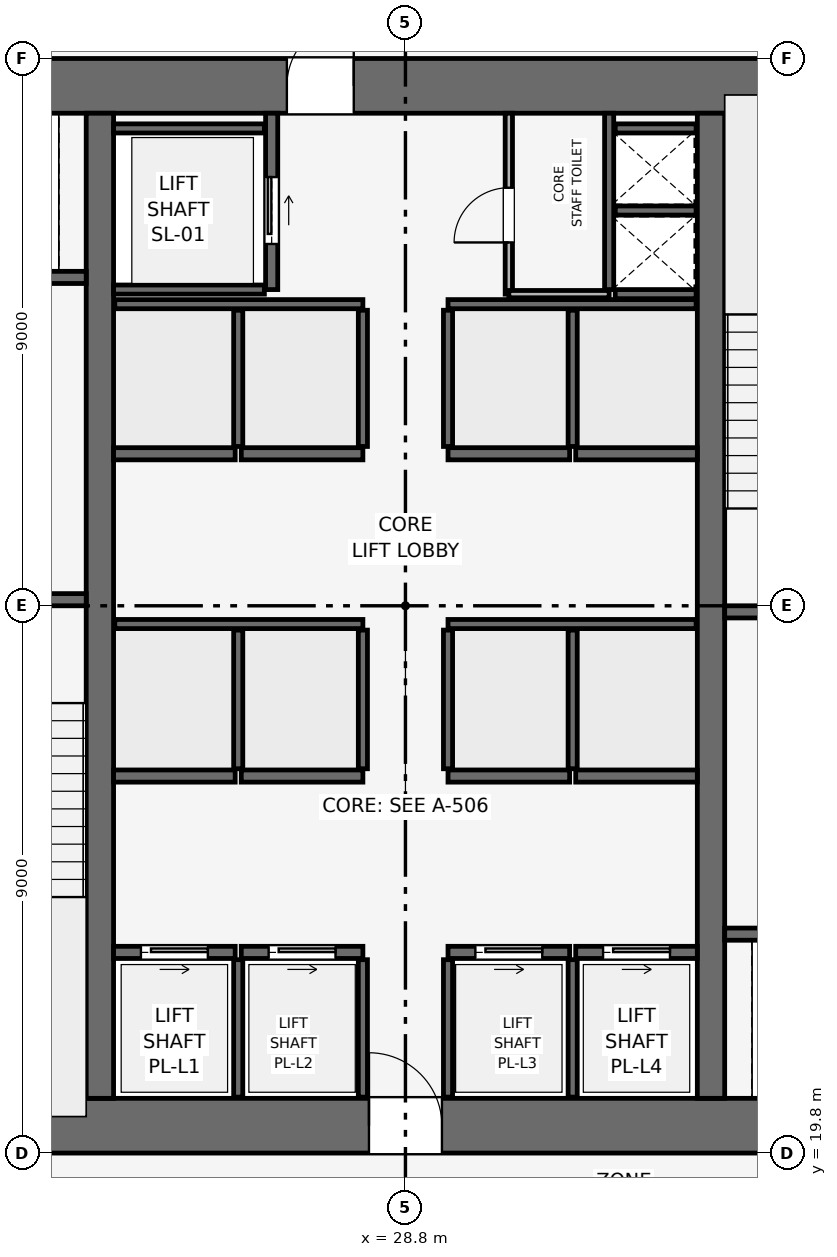
"""IFC4 building model, lengths in metres.
Left out: names, types, materials, properties, quantities, classifications, styles, units other than length and angle.
Written with IfcOpenShell. Run it as: python <this file> out.ifc"""

import sys

from ifc_helpers import new_model, si_unit, direction, frame, frame_2d, origin, place, context, subcontext, project, spatial, rectangle, extrude, element, fill, save


model = new_model("IFC4")
c1 = context("Model", 3, precision=1e-05, world=origin(), true_north=direction((0.0, 1.0)))
c2 = subcontext(c1, "Body", "Model", "MODEL_VIEW")
j1 = project(units=[si_unit("LENGTHUNIT", "METRE"), si_unit("PLANEANGLEUNIT", "RADIAN")], contexts=[c1])
p1 = place(None, origin())
s1 = spatial("IfcSite", under=j1, at=p1, CompositionType="ELEMENT")
p2 = place(p1, origin())
s2 = spatial("IfcBuilding", under=s1, at=p2, CompositionType="ELEMENT")
p3 = place(p2, frame((0.0, 0.0, 125.1)))
s3 = spatial("IfcBuildingStorey", under=s2, at=p3, CompositionType="ELEMENT", Elevation=125.1)
p4 = place(p3, frame((19.8, 20.25, 0.0), z_axis=(0.0, 0.0, 1.0), x_axis=(1.0, 0.0, 0.0)))
e1 = element("IfcWall", 1, at=p4, inside=s3, PredefinedType="SHEAR", context=c2, shape_type="SweptSolid", body=[
    extrude(rectangle(XDim=18.0, YDim=0.9, at=frame_2d((9.0, 0.0))), origin(), (0.0, 0.0, 1.0), 3.9),
])
p5 = place(p4, frame((8.4, 0.0, 0.0)))
e2 = element("IfcOpeningElement", 2, at=p5, cuts=e1, PredefinedType="OPENING", context=c2, shape_type="SweptSolid", body=[
    extrude(rectangle(XDim=1.2, YDim=2.2, at=frame_2d((0.6, 1.1))), frame((0.0, 0.46, 0.0), z_axis=(0.0, -1.0, 0.0), x_axis=(1.0, 0.0, 0.0)), (0.0, 0.0, 1.0), 0.92),
])
p6 = place(p3, frame((19.8, 37.35, 0.0), z_axis=(0.0, 0.0, 1.0), x_axis=(1.0, 0.0, 0.0)))
e3 = element("IfcWall", 3, at=p6, inside=s3, PredefinedType="SHEAR", context=c2, shape_type="SweptSolid", body=[
    extrude(rectangle(XDim=18.0, YDim=0.9, at=frame_2d((9.0, 0.0))), origin(), (0.0, 0.0, 1.0), 3.9),
])
p7 = place(p6, frame((7.05, 0.0, 0.0)))
e4 = element("IfcOpeningElement", 4, at=p7, cuts=e3, PredefinedType="OPENING", context=c2, shape_type="SweptSolid", body=[
    extrude(rectangle(XDim=1.1, YDim=2.15, at=frame_2d((0.55, 1.075))), frame((0.0, 0.46, 0.0), z_axis=(0.0, -1.0, 0.0), x_axis=(1.0, 0.0, 0.0)), (0.0, 0.0, 1.0), 0.92),
])
for number, where, z_axis, x_axis in (
    (5, (23.775, 20.7, 0.0), (0.0, 0.0, 1.0), (0.0, 1.0, 0.0)),
    (6, (33.825, 20.7, 0.0), (0.0, 0.0, 1.0), (0.0, 1.0, 0.0)),
):
    element("IfcWall", number, at=place(p3, frame(where, z_axis=z_axis, x_axis=x_axis)), inside=s3, PredefinedType="SHEAR", context=c2, shape_type="SweptSolid", body=[
        extrude(rectangle(XDim=16.2, YDim=0.45, at=frame_2d((8.1, 0.0))), origin(), (0.0, 0.0, 1.0), 3.9),
    ])
p8 = place(p3, frame((20.4, 28.9, 0.0), z_axis=(0.0, 0.0, 1.0), x_axis=(1.0, 0.0, 0.0)))
e7 = element("IfcWall", 7, at=p8, inside=s3, PredefinedType="SHEAR", context=c2, shape_type="SweptSolid", body=[
    extrude(rectangle(XDim=3.15, YDim=0.2, at=frame_2d((1.575, 0.0))), origin(), (0.0, 0.0, 1.0), 3.65),
])
p9 = place(p8, frame((0.8, 0.0, 0.0)))
e8 = element("IfcOpeningElement", 8, at=p9, cuts=e7, PredefinedType="OPENING", context=c2, shape_type="SweptSolid", body=[
    extrude(rectangle(XDim=1.0, YDim=2.1, at=frame_2d((0.5, 1.05))), frame((0.0, 0.11, 0.0), z_axis=(0.0, -1.0, 0.0), x_axis=(1.0, 0.0, 0.0)), (0.0, 0.0, 1.0), 0.22),
])
p10 = place(p3, frame((34.05, 28.7, 0.0), z_axis=(0.0, 0.0, 1.0), x_axis=(1.0, 0.0, 0.0)))
e9 = element("IfcWall", 9, at=p10, inside=s3, PredefinedType="SHEAR", context=c2, shape_type="SweptSolid", body=[
    extrude(rectangle(XDim=3.15, YDim=0.2, at=frame_2d((1.575, 0.0))), origin(), (0.0, 0.0, 1.0), 3.65),
])
p11 = place(p10, frame((0.8, 0.0, 0.0)))
e10 = element("IfcOpeningElement", 10, at=p11, cuts=e9, PredefinedType="OPENING", context=c2, shape_type="SweptSolid", body=[
    extrude(rectangle(XDim=1.0, YDim=2.1, at=frame_2d((0.5, 1.05))), frame((0.0, 0.11, 0.0), z_axis=(0.0, -1.0, 0.0), x_axis=(1.0, 0.0, 0.0)), (0.0, 0.0, 1.0), 0.22),
])
p12 = place(p3, frame((32.15, 34.0, 0.0), z_axis=(0.0, 0.0, 1.0), x_axis=(0.0, 1.0, 0.0)))
e11 = element("IfcWall", 11, at=p12, inside=s3, PredefinedType="SHEAR", context=c2, shape_type="SweptSolid", body=[
    extrude(rectangle(XDim=2.9, YDim=0.15, at=frame_2d((1.45, 0.0))), origin(), (0.0, 0.0, 1.0), 3.65),
])
for number, where, z_axis, x_axis in (
    (12, (32.25, 33.925, 0.0), (0.0, 0.0, 1.0), (1.0, 0.0, 0.0)),
    (13, (32.25, 35.3, 0.0), (0.0, 0.0, 1.0), (1.0, 0.0, 0.0)),
):
    element("IfcWall", number, at=place(p3, frame(where, z_axis=z_axis, x_axis=x_axis)), inside=s3, PredefinedType="SHEAR", context=c2, shape_type="SweptSolid", body=[
        extrude(rectangle(XDim=1.33, YDim=0.15, at=frame_2d((0.665, 0.0))), origin(), (0.0, 0.0, 1.0), 3.65),
    ])
p13 = place(p3, frame((20.5, 34.2, 0.0), z_axis=(0.0, 0.0, 1.0), x_axis=(1.0, 0.0, 0.0)))
e14 = element("IfcWall", 14, at=p13, inside=s3, PredefinedType="SHEAR", context=c2, shape_type="SweptSolid", body=[
    extrude(rectangle(XDim=3.05, YDim=0.2, at=frame_2d((1.525, 0.0))), origin(), (0.0, 0.0, 1.0), 3.65),
])
p14 = place(p13, frame((0.75, 0.0, 0.0)))
e15 = element("IfcOpeningElement", 15, at=p14, cuts=e14, PredefinedType="OPENING", context=c2, shape_type="SweptSolid", body=[
    extrude(rectangle(XDim=1.1, YDim=2.15, at=frame_2d((0.55, 1.075))), frame((0.0, 0.11, 0.0), z_axis=(0.0, -1.0, 0.0), x_axis=(1.0, 0.0, 0.0)), (0.0, 0.0, 1.0), 0.22),
])
p15 = place(p3, frame((34.05, 23.4, 0.0), z_axis=(0.0, 0.0, 1.0), x_axis=(1.0, 0.0, 0.0)))
e16 = element("IfcWall", 16, at=p15, inside=s3, PredefinedType="SHEAR", context=c2, shape_type="SweptSolid", body=[
    extrude(rectangle(XDim=3.05, YDim=0.2, at=frame_2d((1.525, 0.0))), origin(), (0.0, 0.0, 1.0), 3.65),
])
p16 = place(p15, frame((1.2, 0.0, 0.0)))
e17 = element("IfcOpeningElement", 17, at=p16, cuts=e16, PredefinedType="OPENING", context=c2, shape_type="SweptSolid", body=[
    extrude(rectangle(XDim=1.1, YDim=2.15, at=frame_2d((0.55, 1.075))), frame((0.0, 0.11, 0.0), z_axis=(0.0, -1.0, 0.0), x_axis=(1.0, 0.0, 0.0)), (0.0, 0.0, 1.0), 0.22),
])
p17 = place(p3, frame((26.6, 34.0, 0.0), z_axis=(0.0, 0.0, 1.0), x_axis=(0.0, 1.0, 0.0)))
e18 = element("IfcWall", 18, at=p17, inside=s3, PredefinedType="SHEAR", context=c2, shape_type="SweptSolid", body=[
    extrude(rectangle(XDim=2.9, YDim=0.2, at=frame_2d((1.45, 0.0))), origin(), (0.0, 0.0, 1.0), 3.65),
])
p18 = place(p17, frame((0.75, 0.0, 0.0)))
e19 = element("IfcOpeningElement", 19, at=p18, cuts=e18, PredefinedType="OPENING", context=c2, shape_type="SweptSolid", body=[
    extrude(rectangle(XDim=1.1, YDim=2.15, at=frame_2d((0.55, 1.075))), frame((0.0, 0.11, 0.0), z_axis=(0.0, -1.0, 0.0), x_axis=(1.0, 0.0, 0.0)), (0.0, 0.0, 1.0), 0.22),
])
for number, where, z_axis, x_axis in (
    (20, (24.0, 34.0, 0.0), (0.0, 0.0, 1.0), (1.0, 0.0, 0.0)),
    (21, (24.0, 36.65, 0.0), (0.0, 0.0, 1.0), (1.0, 0.0, 0.0)),
):
    element("IfcWall", number, at=place(p3, frame(where, z_axis=z_axis, x_axis=x_axis)), inside=s3, PredefinedType="SHEAR", context=c2, shape_type="SweptSolid", body=[
        extrude(rectangle(XDim=2.48, YDim=0.15, at=frame_2d((1.24, 0.0))), origin(), (0.0, 0.0, 1.0), 3.65),
    ])
p19 = place(p3, frame((24.0, 23.1, 0.0), z_axis=(0.0, 0.0, 1.0), x_axis=(1.0, 0.0, 0.0)))
e22 = element("IfcWall", 22, at=p19, inside=s3, PredefinedType="SHEAR", context=c2, shape_type="SweptSolid", body=[
    extrude(rectangle(XDim=2.0, YDim=0.2, at=frame_2d((1.0, 0.0))), origin(), (0.0, 0.0, 1.0), 3.65),
])
p20 = place(p19, frame((0.45, 0.0, 0.0)))
e23 = element("IfcOpeningElement", 23, at=p20, cuts=e22, PredefinedType="OPENING", context=c2, shape_type="SweptSolid", body=[
    extrude(rectangle(XDim=1.1, YDim=2.15, at=frame_2d((0.55, 1.075))), frame((0.0, 0.11, 0.0), z_axis=(0.0, -1.0, 0.0), x_axis=(1.0, 0.0, 0.0)), (0.0, 0.0, 1.0), 0.22),
])
p21 = place(p3, frame((26.1, 23.1, 0.0), z_axis=(0.0, 0.0, 1.0), x_axis=(1.0, 0.0, 0.0)))
e24 = element("IfcWall", 24, at=p21, inside=s3, PredefinedType="SHEAR", context=c2, shape_type="SweptSolid", body=[
    extrude(rectangle(XDim=2.0, YDim=0.2, at=frame_2d((1.0, 0.0))), origin(), (0.0, 0.0, 1.0), 3.65),
])
p22 = place(p21, frame((0.45, 0.0, 0.0)))
e25 = element("IfcOpeningElement", 25, at=p22, cuts=e24, PredefinedType="OPENING", context=c2, shape_type="SweptSolid", body=[
    extrude(rectangle(XDim=1.1, YDim=2.15, at=frame_2d((0.55, 1.075))), frame((0.0, 0.11, 0.0), z_axis=(0.0, -1.0, 0.0), x_axis=(1.0, 0.0, 0.0)), (0.0, 0.0, 1.0), 0.22),
])
p23 = place(p3, frame((29.5, 23.1, 0.0), z_axis=(0.0, 0.0, 1.0), x_axis=(1.0, 0.0, 0.0)))
e26 = element("IfcWall", 26, at=p23, inside=s3, PredefinedType="SHEAR", context=c2, shape_type="SweptSolid", body=[
    extrude(rectangle(XDim=2.0, YDim=0.2, at=frame_2d((1.0, 0.0))), origin(), (0.0, 0.0, 1.0), 3.65),
])
p24 = place(p23, frame((0.45, 0.0, 0.0)))
e27 = element("IfcOpeningElement", 27, at=p24, cuts=e26, PredefinedType="OPENING", context=c2, shape_type="SweptSolid", body=[
    extrude(rectangle(XDim=1.1, YDim=2.15, at=frame_2d((0.55, 1.075))), frame((0.0, 0.11, 0.0), z_axis=(0.0, -1.0, 0.0), x_axis=(1.0, 0.0, 0.0)), (0.0, 0.0, 1.0), 0.22),
])
p25 = place(p3, frame((31.6, 23.1, 0.0), z_axis=(0.0, 0.0, 1.0), x_axis=(1.0, 0.0, 0.0)))
e28 = element("IfcWall", 28, at=p25, inside=s3, PredefinedType="SHEAR", context=c2, shape_type="SweptSolid", body=[
    extrude(rectangle(XDim=2.0, YDim=0.2, at=frame_2d((1.0, 0.0))), origin(), (0.0, 0.0, 1.0), 3.65),
])
p26 = place(p25, frame((0.45, 0.0, 0.0)))
e29 = element("IfcOpeningElement", 29, at=p26, cuts=e28, PredefinedType="OPENING", context=c2, shape_type="SweptSolid", body=[
    extrude(rectangle(XDim=1.1, YDim=2.15, at=frame_2d((0.55, 1.075))), frame((0.0, 0.11, 0.0), z_axis=(0.0, -1.0, 0.0), x_axis=(1.0, 0.0, 0.0)), (0.0, 0.0, 1.0), 0.22),
])
for number, where, z_axis, x_axis in (
    (30, (24.0, 26.0, 0.0), (0.0, 0.0, 1.0), (1.0, 0.0, 0.0)),
    (31, (26.1, 26.0, 0.0), (0.0, 0.0, 1.0), (1.0, 0.0, 0.0)),
    (32, (29.5, 26.0, 0.0), (0.0, 0.0, 1.0), (1.0, 0.0, 0.0)),
    (33, (31.6, 26.0, 0.0), (0.0, 0.0, 1.0), (1.0, 0.0, 0.0)),
    (34, (24.0, 31.3, 0.0), (0.0, 0.0, 1.0), (1.0, 0.0, 0.0)),
    (35, (26.1, 31.3, 0.0), (0.0, 0.0, 1.0), (1.0, 0.0, 0.0)),
    (36, (29.5, 31.3, 0.0), (0.0, 0.0, 1.0), (1.0, 0.0, 0.0)),
    (37, (31.6, 31.3, 0.0), (0.0, 0.0, 1.0), (1.0, 0.0, 0.0)),
):
    element("IfcWall", number, at=place(p3, frame(where, z_axis=z_axis, x_axis=x_axis)), inside=s3, PredefinedType="SHEAR", context=c2, shape_type="SweptSolid", body=[
        extrude(rectangle(XDim=2.0, YDim=0.2, at=frame_2d((1.0, 0.0))), origin(), (0.0, 0.0, 1.0), 3.65),
    ])
p27 = place(p3, frame((32.25, 36.65, 0.0), z_axis=(0.0, 0.0, 1.0), x_axis=(1.0, 0.0, 0.0)))
e38 = element("IfcWall", 38, at=p27, inside=s3, PredefinedType="SHEAR", context=c2, shape_type="SweptSolid", body=[
    extrude(rectangle(XDim=1.33, YDim=0.15, at=frame_2d((0.665, 0.0))), origin(), (0.0, 0.0, 1.0), 3.65),
])
for number, where, z_axis, x_axis in (
    (39, (26.05, 20.72, 0.0), (0.0, 0.0, 1.0), (0.0, 1.0, 0.0)),
    (40, (28.1, 20.72, 0.0), (0.0, 0.0, 1.0), (0.0, 1.0, 0.0)),
    (41, (29.5, 20.72, 0.0), (0.0, 0.0, 1.0), (0.0, 1.0, 0.0)),
    (42, (31.55, 20.72, 0.0), (0.0, 0.0, 1.0), (0.0, 1.0, 0.0)),
):
    element("IfcWall", number, at=place(p3, frame(where, z_axis=z_axis, x_axis=x_axis)), inside=s3, PredefinedType="SHEAR", context=c2, shape_type="SweptSolid", body=[
        extrude(rectangle(XDim=2.26, YDim=0.15, at=frame_2d((1.13, 0.0))), origin(), (0.0, 0.0, 1.0), 3.65),
    ])
for number, where, z_axis, x_axis in (
    (43, (24.02, 28.5, 0.0), (0.0, 0.0, 1.0), (1.0, 0.0, 0.0)),
    (44, (29.5, 28.5, 0.0), (0.0, 0.0, 1.0), (1.0, 0.0, 0.0)),
):
    element("IfcWall", number, at=place(p3, frame(where, z_axis=z_axis, x_axis=x_axis)), inside=s3, PredefinedType="SHEAR", context=c2, shape_type="SweptSolid", body=[
        extrude(rectangle(XDim=4.08, YDim=0.15, at=frame_2d((2.04, 0.0))), origin(), (0.0, 0.0, 1.0), 3.65),
    ])
for number, where, z_axis, x_axis in (
    (45, (26.05, 26.12, 0.0), (0.0, 0.0, 1.0), (0.0, 1.0, 0.0)),
    (46, (28.1, 26.12, 0.0), (0.0, 0.0, 1.0), (0.0, 1.0, 0.0)),
    (47, (29.5, 26.12, 0.0), (0.0, 0.0, 1.0), (0.0, 1.0, 0.0)),
    (48, (31.55, 26.12, 0.0), (0.0, 0.0, 1.0), (0.0, 1.0, 0.0)),
):
    element("IfcWall", number, at=place(p3, frame(where, z_axis=z_axis, x_axis=x_axis)), inside=s3, PredefinedType="SHEAR", context=c2, shape_type="SweptSolid", body=[
        extrude(rectangle(XDim=2.28, YDim=0.15, at=frame_2d((1.14, 0.0))), origin(), (0.0, 0.0, 1.0), 3.65),
    ])
for number, where, z_axis, x_axis in (
    (49, (24.02, 33.76, 0.0), (0.0, 0.0, 1.0), (1.0, 0.0, 0.0)),
    (50, (29.5, 33.76, 0.0), (0.0, 0.0, 1.0), (1.0, 0.0, 0.0)),
):
    element("IfcWall", number, at=place(p3, frame(where, z_axis=z_axis, x_axis=x_axis)), inside=s3, PredefinedType="SHEAR", context=c2, shape_type="SweptSolid", body=[
        extrude(rectangle(XDim=4.08, YDim=0.15, at=frame_2d((2.04, 0.0))), origin(), (0.0, 0.0, 1.0), 3.65),
    ])
for number, where, z_axis, x_axis in (
    (51, (26.05, 31.42, 0.0), (0.0, 0.0, 1.0), (0.0, 1.0, 0.0)),
    (52, (28.1, 31.42, 0.0), (0.0, 0.0, 1.0), (0.0, 1.0, 0.0)),
    (53, (29.5, 31.42, 0.0), (0.0, 0.0, 1.0), (0.0, 1.0, 0.0)),
    (54, (31.55, 31.42, 0.0), (0.0, 0.0, 1.0), (0.0, 1.0, 0.0)),
):
    element("IfcWall", number, at=place(p3, frame(where, z_axis=z_axis, x_axis=x_axis)), inside=s3, PredefinedType="SHEAR", context=c2, shape_type="SweptSolid", body=[
        extrude(rectangle(XDim=2.24, YDim=0.15, at=frame_2d((1.12, 0.0))), origin(), (0.0, 0.0, 1.0), 3.65),
    ])
p28 = place(p3, frame((30.5, 33.925, 0.0), z_axis=(0.0, 0.0, 1.0), x_axis=(0.0, 1.0, 0.0)))
e55 = element("IfcWall", 55, at=p28, inside=s3, PredefinedType="PARTITIONING", context=c2, shape_type="SweptSolid", body=[
    extrude(rectangle(XDim=2.975, YDim=0.12, at=frame_2d((1.487, 0.0))), origin(), (0.0, 0.0, 1.0), 3.65),
])
p29 = place(p28, frame((0.85, 0.0, 0.0)))
e56 = element("IfcOpeningElement", 56, at=p29, cuts=e55, PredefinedType="OPENING", context=c2, shape_type="SweptSolid", body=[
    extrude(rectangle(XDim=0.9, YDim=2.1, at=frame_2d((0.45, 1.05))), frame((0.0, 0.07, 0.0), z_axis=(0.0, -1.0, 0.0), x_axis=(1.0, 0.0, 0.0)), (0.0, 0.0, 1.0), 0.14),
])
p30 = place(p3, frame((30.5, 33.925, 0.0), z_axis=(0.0, 0.0, 1.0), x_axis=(1.0, 0.0, 0.0)))
e57 = element("IfcWall", 57, at=p30, inside=s3, PredefinedType="PARTITIONING", context=c2, shape_type="SweptSolid", body=[
    extrude(rectangle(XDim=1.65, YDim=0.12, at=frame_2d((0.825, 0.0))), origin(), (0.0, 0.0, 1.0), 3.65),
])
p31 = place(p18, origin())
e58 = element("IfcDoor", 58, at=p31, inside=s3, OperationType="SLIDING_TO_RIGHT", PredefinedType="DOOR", context=c2, shape_type="SweptSolid", body=[
    extrude(rectangle(XDim=1.1, YDim=2.15, at=frame_2d((0.55, 1.075))), frame((0.0, 0.025, 0.0), z_axis=(0.0, -1.0, 0.0), x_axis=(1.0, 0.0, 0.0)), (0.0, 0.0, 1.0), 0.05),
])
fill(e19, e58)
p32 = place(p20, origin())
e59 = element("IfcDoor", 59, at=p32, inside=s3, OperationType="SLIDING_TO_RIGHT", PredefinedType="DOOR", context=c2, shape_type="SweptSolid", body=[
    extrude(rectangle(XDim=1.1, YDim=2.15, at=frame_2d((0.55, 1.075))), frame((0.0, 0.025, 0.0), z_axis=(0.0, -1.0, 0.0), x_axis=(1.0, 0.0, 0.0)), (0.0, 0.0, 1.0), 0.05),
])
fill(e23, e59)
p33 = place(p22, origin())
e60 = element("IfcDoor", 60, at=p33, inside=s3, OperationType="SLIDING_TO_RIGHT", PredefinedType="DOOR", context=c2, shape_type="SweptSolid", body=[
    extrude(rectangle(XDim=1.1, YDim=2.15, at=frame_2d((0.55, 1.075))), frame((0.0, 0.025, 0.0), z_axis=(0.0, -1.0, 0.0), x_axis=(1.0, 0.0, 0.0)), (0.0, 0.0, 1.0), 0.05),
])
fill(e25, e60)
p34 = place(p24, origin())
e61 = element("IfcDoor", 61, at=p34, inside=s3, OperationType="SLIDING_TO_RIGHT", PredefinedType="DOOR", context=c2, shape_type="SweptSolid", body=[
    extrude(rectangle(XDim=1.1, YDim=2.15, at=frame_2d((0.55, 1.075))), frame((0.0, 0.025, 0.0), z_axis=(0.0, -1.0, 0.0), x_axis=(1.0, 0.0, 0.0)), (0.0, 0.0, 1.0), 0.05),
])
fill(e27, e61)
p35 = place(p26, origin())
e62 = element("IfcDoor", 62, at=p35, inside=s3, OperationType="SLIDING_TO_RIGHT", PredefinedType="DOOR", context=c2, shape_type="SweptSolid", body=[
    extrude(rectangle(XDim=1.1, YDim=2.15, at=frame_2d((0.55, 1.075))), frame((0.0, 0.025, 0.0), z_axis=(0.0, -1.0, 0.0), x_axis=(1.0, 0.0, 0.0)), (0.0, 0.0, 1.0), 0.05),
])
fill(e29, e62)
p36 = place(p29, origin())
e63 = element("IfcDoor", 63, at=p36, inside=s3, OperationType="SINGLE_SWING_LEFT", PredefinedType="DOOR", context=c2, shape_type="SweptSolid", body=[
    extrude(rectangle(XDim=0.9, YDim=2.1, at=frame_2d((0.45, 1.05))), frame((0.0, 0.025, 0.0), z_axis=(0.0, -1.0, 0.0), x_axis=(1.0, 0.0, 0.0)), (0.0, 0.0, 1.0), 0.05),
])
fill(e56, e63)
p37 = place(p5, origin())
e64 = element("IfcDoor", 64, at=p37, inside=s3, OperationType="SINGLE_SWING_LEFT", PredefinedType="DOOR", context=c2, shape_type="SweptSolid", body=[
    extrude(rectangle(XDim=1.2, YDim=2.2, at=frame_2d((0.6, 1.1))), frame((0.0, 0.025, 0.0), z_axis=(0.0, -1.0, 0.0), x_axis=(1.0, 0.0, 0.0)), (0.0, 0.0, 1.0), 0.05),
])
fill(e2, e64)
p38 = place(p7, origin())
e65 = element("IfcDoor", 65, at=p38, inside=s3, OperationType="SINGLE_SWING_RIGHT", PredefinedType="DOOR", context=c2, shape_type="SweptSolid", body=[
    extrude(rectangle(XDim=1.1, YDim=2.15, at=frame_2d((0.55, 1.075))), frame((0.0, 0.025, 0.0), z_axis=(0.0, -1.0, 0.0), x_axis=(1.0, 0.0, 0.0)), (0.0, 0.0, 1.0), 0.05),
])
fill(e4, e65)
save(model, sys.argv[1])
